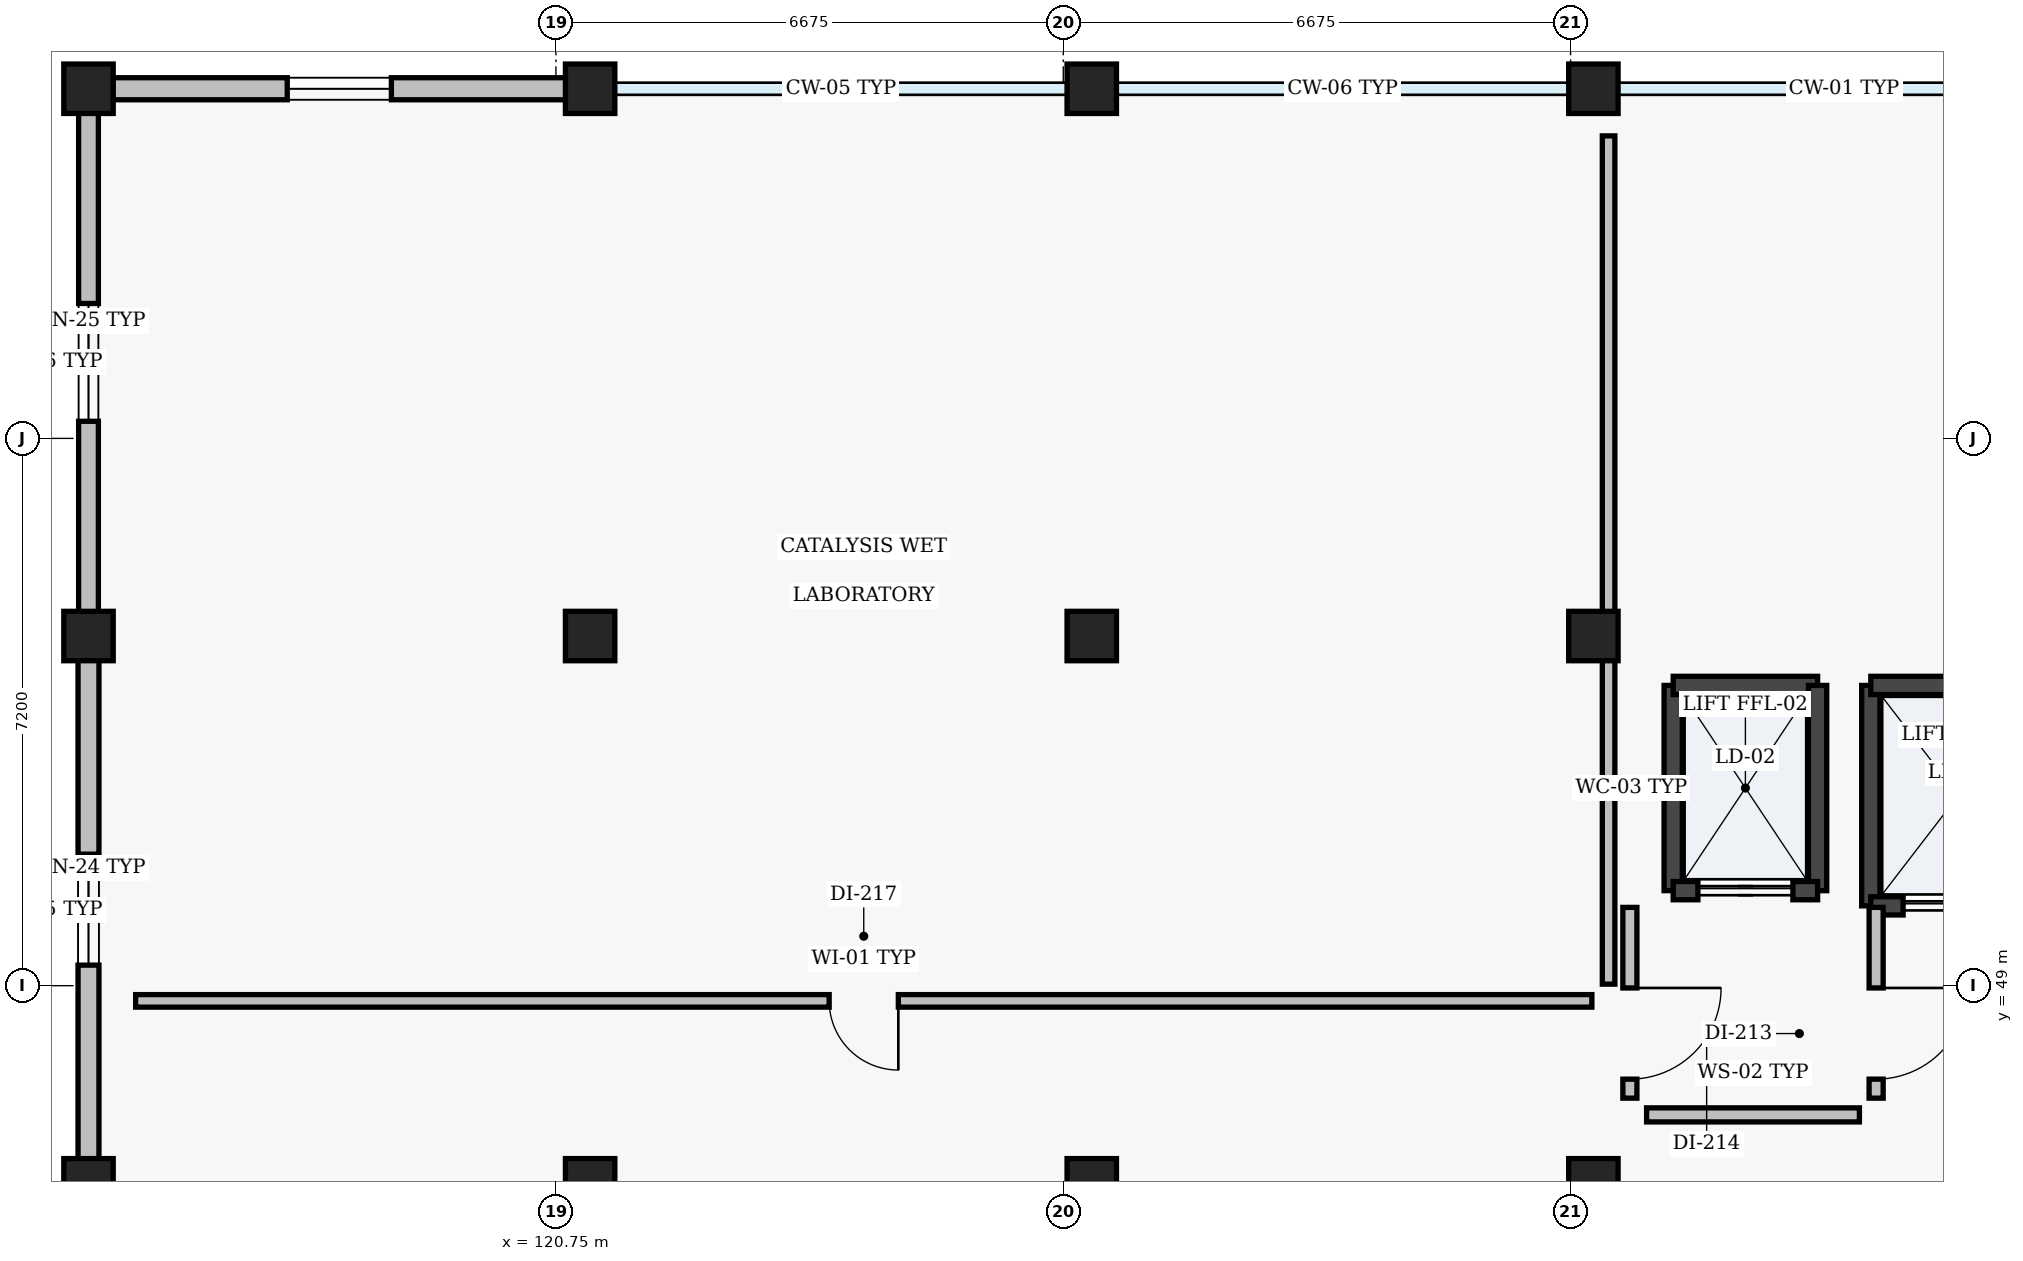
"""IFC4 building model, lengths in metres.
Left out: names, types, materials, properties, quantities, classifications, styles, units other than length and angle.
Written with IfcOpenShell. Run it as: python <this file> out.ifc"""

import sys

from ifc_helpers import new_model, si_unit, direction, frame, frame_2d, origin, origin_2d, place, context, subcontext, project, spatial, rectangle, extrude, element, fill, save


model = new_model("IFC4")
c1 = context("Model", 3, precision=1e-05, world=origin(), true_north=direction((0.0, 1.0)))
c2 = subcontext(c1, "Body", "Model", "MODEL_VIEW")
j1 = project(units=[si_unit("LENGTHUNIT", "METRE"), si_unit("PLANEANGLEUNIT", "RADIAN")], contexts=[c1])
p1 = place(None, origin())
s1 = spatial("IfcSite", under=j1, at=p1, CompositionType="ELEMENT")
p2 = place(p1, origin())
s2 = spatial("IfcBuilding", under=s1, at=p2, CompositionType="ELEMENT")
p3 = place(p2, frame((0.0, 0.0, 14.1)))
s3 = spatial("IfcBuildingStorey", under=s2, at=p3, CompositionType="ELEMENT", Elevation=14.1)
for number, where, z_axis, x_axis in (
    (1, (114.6, 46.4, 0.0), (0.0, 0.0, 1.0), (1.0, 0.0, 0.0)),
    (2, (114.6, 53.6, 0.0), (0.0, 0.0, 1.0), (1.0, 0.0, 0.0)),
    (3, (114.6, 60.8, 0.0), (0.0, 0.0, 1.0), (1.0, 0.0, 0.0)),
    (4, (121.2, 46.4, 0.0), (0.0, 0.0, 1.0), (1.0, 0.0, 0.0)),
    (5, (121.2, 53.6, 0.0), (0.0, 0.0, 1.0), (1.0, 0.0, 0.0)),
    (6, (121.2, 60.8, 0.0), (0.0, 0.0, 1.0), (1.0, 0.0, 0.0)),
    (7, (127.8, 46.4, 0.0), (0.0, 0.0, 1.0), (1.0, 0.0, 0.0)),
    (8, (127.8, 53.6, 0.0), (0.0, 0.0, 1.0), (1.0, 0.0, 0.0)),
    (9, (127.8, 60.8, 0.0), (0.0, 0.0, 1.0), (1.0, 0.0, 0.0)),
    (10, (134.4, 46.4, 0.0), (0.0, 0.0, 1.0), (1.0, 0.0, 0.0)),
    (11, (134.4, 53.6, 0.0), (0.0, 0.0, 1.0), (1.0, 0.0, 0.0)),
    (12, (134.4, 60.8, 0.0), (0.0, 0.0, 1.0), (1.0, 0.0, 0.0)),
):
    element("IfcColumn", number, at=place(p3, frame(where, z_axis=z_axis, x_axis=x_axis)), inside=s3, PredefinedType="COLUMN", context=c2, shape_type="SweptSolid", body=[
        extrude(rectangle(XDim=0.65, YDim=0.65, at=origin_2d()), origin(), (0.0, 0.0, 1.0), 4.29),
    ])
p4 = place(p3, frame((114.6, 46.72, 0.0), z_axis=(0.0, 0.0, 1.0), x_axis=(0.0, 1.0, 0.0)))
e13 = element("IfcWall", 13, at=p4, inside=s3, PredefinedType="STANDARD", context=c2, shape_type="SweptSolid", body=[
    extrude(rectangle(XDim=6.56, YDim=0.275, at=frame_2d((3.28, 0.0))), origin(), (0.0, 0.0, 1.0), 3.775),
])
p5 = place(p4, frame((2.55, 0.0, 0.95)))
e14 = element("IfcOpeningElement", 14, at=p5, cuts=e13, PredefinedType="OPENING", context=c2, shape_type="SweptSolid", body=[
    extrude(rectangle(XDim=1.46, YDim=1.44, at=frame_2d((0.73, 0.72))), frame((0.0, 0.137, 0.0), z_axis=(0.0, -1.0, 0.0), x_axis=(1.0, 0.0, 0.0)), (0.0, 0.0, 1.0), 0.275),
])
p6 = place(p3, frame((114.6, 53.92, 0.0), z_axis=(0.0, 0.0, 1.0), x_axis=(0.0, 1.0, 0.0)))
e15 = element("IfcWall", 15, at=p6, inside=s3, PredefinedType="STANDARD", context=c2, shape_type="SweptSolid", body=[
    extrude(rectangle(XDim=6.56, YDim=0.26, at=frame_2d((3.28, 0.0))), origin(), (0.0, 0.0, 1.0), 3.775),
])
p7 = place(p6, frame((2.505, 0.0, 0.95)))
e16 = element("IfcOpeningElement", 16, at=p7, cuts=e15, PredefinedType="OPENING", context=c2, shape_type="SweptSolid", body=[
    extrude(rectangle(XDim=1.55, YDim=1.46, at=frame_2d((0.775, 0.73))), frame((0.0, 0.13, 0.0), z_axis=(0.0, -1.0, 0.0), x_axis=(1.0, 0.0, 0.0)), (0.0, 0.0, 1.0), 0.26),
])
p8 = place(p3, frame((114.92, 60.8, 0.0), z_axis=(0.0, 0.0, 1.0), x_axis=(1.0, 0.0, 0.0)))
e17 = element("IfcWall", 17, at=p8, inside=s3, PredefinedType="STANDARD", context=c2, shape_type="SweptSolid", body=[
    extrude(rectangle(XDim=5.96, YDim=0.29, at=frame_2d((2.98, 0.0))), origin(), (0.0, 0.0, 1.0), 3.775),
])
p9 = place(p8, frame((2.295, 0.0, 0.95)))
e18 = element("IfcOpeningElement", 18, at=p9, cuts=e17, PredefinedType="OPENING", context=c2, shape_type="SweptSolid", body=[
    extrude(rectangle(XDim=1.37, YDim=1.42, at=frame_2d((0.685, 0.71))), frame((0.0, 0.145, 0.0), z_axis=(0.0, -1.0, 0.0), x_axis=(1.0, 0.0, 0.0)), (0.0, 0.0, 1.0), 0.29),
])
p10 = place(p3, frame((135.45, 50.25, 0.0), z_axis=(0.0, 0.0, 1.0), x_axis=(0.0, 1.0, 0.0)))
e19 = element("IfcWall", 19, at=p10, inside=s3, PredefinedType="SHEAR", context=c2, shape_type="SweptSolid", body=[
    extrude(rectangle(XDim=2.7, YDim=0.24, at=frame_2d((1.35, 0.0))), origin(), (0.0, 0.0, 1.0), 4.28),
])
p11 = place(p3, frame((135.45, 52.95, 0.0), z_axis=(0.0, 0.0, 1.0), x_axis=(1.0, 0.0, 0.0)))
e20 = element("IfcWall", 20, at=p11, inside=s3, PredefinedType="SHEAR", context=c2, shape_type="SweptSolid", body=[
    extrude(rectangle(XDim=1.9, YDim=0.24, at=frame_2d((0.95, 0.0))), origin(), (0.0, 0.0, 1.0), 4.28),
])
p12 = place(p3, frame((137.35, 52.95, 0.0), z_axis=(0.0, 0.0, 1.0), x_axis=(0.0, -1.0, 0.0)))
e21 = element("IfcWall", 21, at=p12, inside=s3, PredefinedType="SHEAR", context=c2, shape_type="SweptSolid", body=[
    extrude(rectangle(XDim=2.7, YDim=0.24, at=frame_2d((1.35, 0.0))), origin(), (0.0, 0.0, 1.0), 4.28),
])
p13 = place(p3, frame((137.35, 50.25, 0.0), z_axis=(0.0, 0.0, 1.0), x_axis=(-1.0, 0.0, 0.0)))
e22 = element("IfcWall", 22, at=p13, inside=s3, PredefinedType="SHEAR", context=c2, shape_type="SweptSolid", body=[
    extrude(rectangle(XDim=1.9, YDim=0.24, at=frame_2d((0.95, 0.0))), origin(), (0.0, 0.0, 1.0), 4.28),
])
p14 = place(p13, frame((0.325, 0.0, 0.0)))
e23 = element("IfcOpeningElement", 23, at=p14, cuts=e22, PredefinedType="OPENING", context=c2, shape_type="SweptSolid", body=[
    extrude(rectangle(XDim=1.25, YDim=2.2, at=frame_2d((0.625, 1.1))), frame((0.0, 0.12, 0.0), z_axis=(0.0, -1.0, 0.0), x_axis=(1.0, 0.0, 0.0)), (0.0, 0.0, 1.0), 0.24),
])
p15 = place(p3, frame((138.05, 50.05, 0.0), z_axis=(0.0, 0.0, 1.0), x_axis=(0.0, 1.0, 0.0)))
e24 = element("IfcWall", 24, at=p15, inside=s3, PredefinedType="SHEAR", context=c2, shape_type="SweptSolid", body=[
    extrude(rectangle(XDim=2.9, YDim=0.24, at=frame_2d((1.45, 0.0))), origin(), (0.0, 0.0, 1.0), 4.28),
])
p16 = place(p3, frame((138.05, 52.95, 0.0), z_axis=(0.0, 0.0, 1.0), x_axis=(1.0, 0.0, 0.0)))
e25 = element("IfcWall", 25, at=p16, inside=s3, PredefinedType="SHEAR", context=c2, shape_type="SweptSolid", body=[
    extrude(rectangle(XDim=2.3, YDim=0.24, at=frame_2d((1.15, 0.0))), origin(), (0.0, 0.0, 1.0), 4.28),
])
p17 = place(p3, frame((140.35, 50.05, 0.0), z_axis=(0.0, 0.0, 1.0), x_axis=(-1.0, 0.0, 0.0)))
e26 = element("IfcWall", 26, at=p17, inside=s3, PredefinedType="SHEAR", context=c2, shape_type="SweptSolid", body=[
    extrude(rectangle(XDim=2.3, YDim=0.24, at=frame_2d((1.15, 0.0))), origin(), (0.0, 0.0, 1.0), 4.28),
])
p18 = place(p17, frame((0.425, 0.0, 0.0)))
e27 = element("IfcOpeningElement", 27, at=p18, cuts=e26, PredefinedType="OPENING", context=c2, shape_type="SweptSolid", body=[
    extrude(rectangle(XDim=1.45, YDim=2.3, at=frame_2d((0.725, 1.15))), frame((0.0, 0.12, 0.0), z_axis=(0.0, -1.0, 0.0), x_axis=(1.0, 0.0, 0.0)), (0.0, 0.0, 1.0), 0.24),
])
p19 = place(p3, frame((135.1, 47.3, 0.0), z_axis=(0.0, 0.0, 1.0), x_axis=(1.0, 0.0, 0.0)))
e28 = element("IfcWall", 28, at=p19, inside=s3, PredefinedType="SOLIDWALL", context=c2, shape_type="SweptSolid", body=[
    extrude(rectangle(XDim=2.8, YDim=0.185, at=frame_2d((1.4, 0.0))), origin(), (0.0, 0.0, 1.0), 3.95),
])
p20 = place(p3, frame((138.12, 47.52, 0.0), z_axis=(0.0, 0.0, 1.0), x_axis=(0.0, 1.0, 0.0)))
e29 = element("IfcWall", 29, at=p20, inside=s3, PredefinedType="SOLIDWALL", context=c2, shape_type="SweptSolid", body=[
    extrude(rectangle(XDim=2.51, YDim=0.185, at=frame_2d((1.255, 0.0))), origin(), (0.0, 0.0, 1.0), 3.95),
])
p21 = place(p20, frame((0.25, 0.0, 0.0)))
e30 = element("IfcOpeningElement", 30, at=p21, cuts=e29, PredefinedType="OPENING", context=c2, shape_type="SweptSolid", body=[
    extrude(rectangle(XDim=1.2, YDim=2.15, at=frame_2d((0.6, 1.075))), frame((0.0, 0.093, 0.0), z_axis=(0.0, -1.0, 0.0), x_axis=(1.0, 0.0, 0.0)), (0.0, 0.0, 1.0), 0.185),
])
p22 = place(p3, frame((134.88, 50.03, 0.0), z_axis=(0.0, 0.0, 1.0), x_axis=(0.0, -1.0, 0.0)))
e31 = element("IfcWall", 31, at=p22, inside=s3, PredefinedType="SOLIDWALL", context=c2, shape_type="SweptSolid", body=[
    extrude(rectangle(XDim=2.51, YDim=0.185, at=frame_2d((1.255, 0.0))), origin(), (0.0, 0.0, 1.0), 3.95),
])
p23 = place(p22, frame((1.06, 0.0, 0.0)))
e32 = element("IfcOpeningElement", 32, at=p23, cuts=e31, PredefinedType="OPENING", context=c2, shape_type="SweptSolid", body=[
    extrude(rectangle(XDim=1.2, YDim=2.15, at=frame_2d((0.6, 1.075))), frame((0.0, 0.093, 0.0), z_axis=(0.0, -1.0, 0.0), x_axis=(1.0, 0.0, 0.0)), (0.0, 0.0, 1.0), 0.185),
])
p24 = place(p3, frame((115.22, 48.8, 0.0), z_axis=(0.0, 0.0, 1.0), x_axis=(1.0, 0.0, 0.0)))
e33 = element("IfcWall", 33, at=p24, inside=s3, PredefinedType="PARTITIONING", context=c2, shape_type="SweptSolid", body=[
    extrude(rectangle(XDim=19.16, YDim=0.165, at=frame_2d((9.58, 0.0))), origin(), (0.0, 0.0, 1.0), 3.875),
])
p25 = place(p24, frame((9.125, 0.0, 0.0)))
e34 = element("IfcOpeningElement", 34, at=p25, cuts=e33, PredefinedType="OPENING", context=c2, shape_type="SweptSolid", body=[
    extrude(rectangle(XDim=0.91, YDim=2.08, at=frame_2d((0.455, 1.04))), frame((0.0, 0.083, 0.0), z_axis=(0.0, -1.0, 0.0), x_axis=(1.0, 0.0, 0.0)), (0.0, 0.0, 1.0), 0.165),
])
p26 = place(p3, frame((134.6, 49.02, 0.0), z_axis=(0.0, 0.0, 1.0), x_axis=(0.0, 1.0, 0.0)))
e35 = element("IfcWall", 35, at=p26, inside=s3, PredefinedType="PARTITIONING", context=c2, shape_type="SweptSolid", body=[
    extrude(rectangle(XDim=11.16, YDim=0.165, at=frame_2d((5.58, 0.0))), origin(), (0.0, 0.0, 1.0), 3.675),
])
p27 = place(p5, origin())
e36 = element("IfcWindow", 36, at=p27, inside=s3, PartitioningType="SINGLE_PANEL", PredefinedType="WINDOW", context=c2, shape_type="SweptSolid", body=[
    extrude(rectangle(XDim=1.46, YDim=1.44, at=frame_2d((0.73, 0.72))), frame((0.0, 0.03, 0.0), z_axis=(0.0, -1.0, 0.0), x_axis=(1.0, 0.0, 0.0)), (0.0, 0.0, 1.0), 0.06),
])
fill(e14, e36)
p28 = place(p7, origin())
e37 = element("IfcWindow", 37, at=p28, inside=s3, PartitioningType="SINGLE_PANEL", PredefinedType="WINDOW", context=c2, shape_type="SweptSolid", body=[
    extrude(rectangle(XDim=1.55, YDim=1.46, at=frame_2d((0.775, 0.73))), frame((0.0, 0.03, 0.0), z_axis=(0.0, -1.0, 0.0), x_axis=(1.0, 0.0, 0.0)), (0.0, 0.0, 1.0), 0.06),
])
fill(e16, e37)
p29 = place(p9, origin())
e38 = element("IfcWindow", 38, at=p29, inside=s3, PartitioningType="SINGLE_PANEL", PredefinedType="WINDOW", context=c2, shape_type="SweptSolid", body=[
    extrude(rectangle(XDim=1.37, YDim=1.42, at=frame_2d((0.685, 0.71))), frame((0.0, 0.03, 0.0), z_axis=(0.0, -1.0, 0.0), x_axis=(1.0, 0.0, 0.0)), (0.0, 0.0, 1.0), 0.06),
])
fill(e18, e38)
p30 = place(p14, origin())
e39 = element("IfcDoor", 39, at=p30, inside=s3, OperationType="SLIDING_TO_RIGHT", PredefinedType="DOOR", context=c2, shape_type="SweptSolid", body=[
    extrude(rectangle(XDim=1.25, YDim=2.2, at=frame_2d((0.625, 1.1))), frame((0.0, 0.025, 0.0), z_axis=(0.0, -1.0, 0.0), x_axis=(1.0, 0.0, 0.0)), (0.0, 0.0, 1.0), 0.05),
])
fill(e23, e39)
p31 = place(p18, origin())
e40 = element("IfcDoor", 40, at=p31, inside=s3, OperationType="DOUBLE_DOOR_SLIDING", PredefinedType="DOOR", context=c2, shape_type="SweptSolid", body=[
    extrude(rectangle(XDim=1.45, YDim=2.3, at=frame_2d((0.725, 1.15))), frame((0.0, 0.025, 0.0), z_axis=(0.0, -1.0, 0.0), x_axis=(1.0, 0.0, 0.0)), (0.0, 0.0, 1.0), 0.05),
])
fill(e27, e40)
p32 = place(p21, origin())
e41 = element("IfcDoor", 41, at=p32, inside=s3, OperationType="SINGLE_SWING_RIGHT", PredefinedType="DOOR", context=c2, shape_type="SweptSolid", body=[
    extrude(rectangle(XDim=1.2, YDim=2.15, at=frame_2d((0.6, 1.075))), frame((0.0, 0.025, 0.0), z_axis=(0.0, -1.0, 0.0), x_axis=(1.0, 0.0, 0.0)), (0.0, 0.0, 1.0), 0.05),
])
fill(e30, e41)
p33 = place(p23, origin())
e42 = element("IfcDoor", 42, at=p33, inside=s3, OperationType="SINGLE_SWING_LEFT", PredefinedType="DOOR", context=c2, shape_type="SweptSolid", body=[
    extrude(rectangle(XDim=1.2, YDim=2.15, at=frame_2d((0.6, 1.075))), frame((0.0, 0.025, 0.0), z_axis=(0.0, -1.0, 0.0), x_axis=(1.0, 0.0, 0.0)), (0.0, 0.0, 1.0), 0.05),
])
fill(e32, e42)
p34 = place(p25, origin())
e43 = element("IfcDoor", 43, at=p34, inside=s3, OperationType="SINGLE_SWING_RIGHT", PredefinedType="DOOR", context=c2, shape_type="SweptSolid", body=[
    extrude(rectangle(XDim=0.91, YDim=2.08, at=frame_2d((0.455, 1.04))), frame((0.0, 0.025, 0.0), z_axis=(0.0, -1.0, 0.0), x_axis=(1.0, 0.0, 0.0)), (0.0, 0.0, 1.0), 0.05),
])
fill(e34, e43)
save(model, sys.argv[1])
